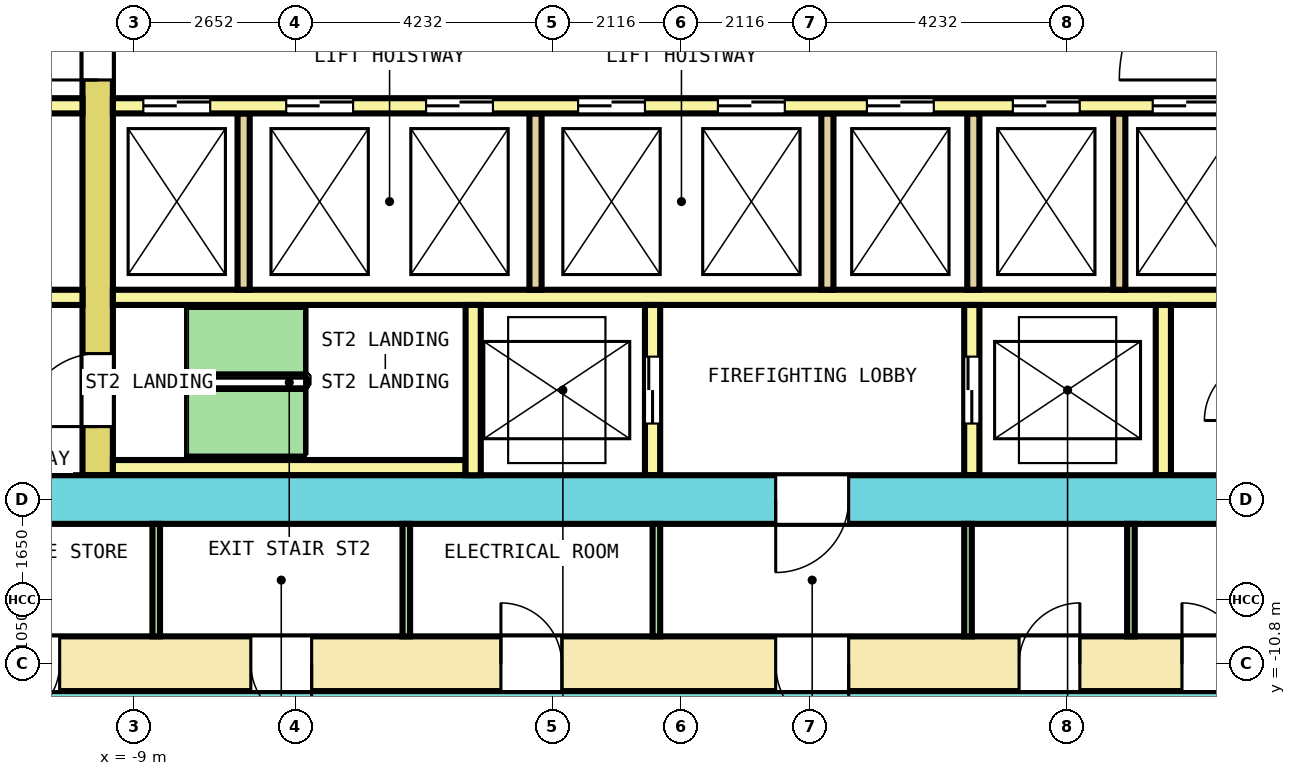
"""IFC4 building model, lengths in metres.
Left out: names, types, materials, properties, quantities, classifications, styles, units other than length and angle.
Written with IfcOpenShell. Run it as: python <this file> out.ifc"""

import sys

from ifc_helpers import new_model, si_unit, direction, frame, frame_2d, origin, place, context, subcontext, project, spatial, rectangle, extrude, element, fill, save


model = new_model("IFC4")
c1 = context("Model", 3, precision=1e-05, world=origin(), true_north=direction((0.0, 1.0)))
c2 = subcontext(c1, "Body", "Model", "MODEL_VIEW")
j1 = project(units=[si_unit("LENGTHUNIT", "METRE"), si_unit("PLANEANGLEUNIT", "RADIAN")], contexts=[c1])
p1 = place(None, origin())
s1 = spatial("IfcSite", under=j1, at=p1, CompositionType="ELEMENT")
p2 = place(p1, origin())
s2 = spatial("IfcBuilding", under=s1, at=p2, CompositionType="ELEMENT")
p3 = place(p2, origin())
s3 = spatial("IfcBuildingStorey", under=s2, at=p3, CompositionType="ELEMENT", Elevation=0.0)
p4 = place(p3, frame((-13.65, -10.8, 0.0), z_axis=(0.0, 0.0, 1.0), x_axis=(1.0, 0.0, 0.0)))
e1 = element("IfcWall", 1, at=p4, inside=s3, PredefinedType="SHEAR", context=c2, shape_type="SweptSolid", body=[
    extrude(rectangle(XDim=27.3, YDim=0.9, at=frame_2d((13.65, 0.0))), origin(), (0.0, 0.0, 1.0), 5.3),
])
p5 = place(p4, frame((2.425, 0.0, 0.0)))
e2 = element("IfcOpeningElement", 2, at=p5, cuts=e1, PredefinedType="OPENING", context=c2, shape_type="SweptSolid", body=[
    extrude(rectangle(XDim=1.0, YDim=2.1, at=frame_2d((0.5, 1.05))), frame((0.0, 0.46, 0.0), z_axis=(0.0, -1.0, 0.0), x_axis=(1.0, 0.0, 0.0)), (0.0, 0.0, 1.0), 0.92),
])
p6 = place(p4, frame((6.569, 0.0, 0.0)))
e3 = element("IfcOpeningElement", 3, at=p6, cuts=e1, PredefinedType="OPENING", context=c2, shape_type="SweptSolid", body=[
    extrude(rectangle(XDim=1.0, YDim=2.1, at=frame_2d((0.5, 1.05))), frame((0.0, 0.46, 0.0), z_axis=(0.0, -1.0, 0.0), x_axis=(1.0, 0.0, 0.0)), (0.0, 0.0, 1.0), 0.92),
])
p7 = place(p4, frame((10.681, 0.0, 0.0)))
e4 = element("IfcOpeningElement", 4, at=p7, cuts=e1, PredefinedType="OPENING", context=c2, shape_type="SweptSolid", body=[
    extrude(rectangle(XDim=1.0, YDim=2.1, at=frame_2d((0.5, 1.05))), frame((0.0, 0.46, 0.0), z_axis=(0.0, -1.0, 0.0), x_axis=(1.0, 0.0, 0.0)), (0.0, 0.0, 1.0), 0.92),
])
p8 = place(p4, frame((19.202, 0.0, 0.0)))
e5 = element("IfcOpeningElement", 5, at=p8, cuts=e1, PredefinedType="OPENING", context=c2, shape_type="SweptSolid", body=[
    extrude(rectangle(XDim=1.0, YDim=2.1, at=frame_2d((0.5, 1.05))), frame((0.0, 0.46, 0.0), z_axis=(0.0, -1.0, 0.0), x_axis=(1.0, 0.0, 0.0)), (0.0, 0.0, 1.0), 0.92),
])
p9 = place(p4, frame((21.881, 0.0, 0.0)))
e6 = element("IfcOpeningElement", 6, at=p9, cuts=e1, PredefinedType="OPENING", context=c2, shape_type="SweptSolid", body=[
    extrude(rectangle(XDim=1.0, YDim=2.1, at=frame_2d((0.5, 1.05))), frame((0.0, 0.46, 0.0), z_axis=(0.0, -1.0, 0.0), x_axis=(1.0, 0.0, 0.0)), (0.0, 0.0, 1.0), 0.92),
])
p10 = place(p4, frame((24.592, 0.0, 0.0)))
e7 = element("IfcOpeningElement", 7, at=p10, cuts=e1, PredefinedType="OPENING", context=c2, shape_type="SweptSolid", body=[
    extrude(rectangle(XDim=1.0, YDim=2.1, at=frame_2d((0.5, 1.05))), frame((0.0, 0.46, 0.0), z_axis=(0.0, -1.0, 0.0), x_axis=(1.0, 0.0, 0.0)), (0.0, 0.0, 1.0), 0.92),
])
p11 = place(p4, frame((15.2, 0.0, 0.0)))
e8 = element("IfcOpeningElement", 8, at=p11, cuts=e1, PredefinedType="OPENING", context=c2, shape_type="SweptSolid", body=[
    extrude(rectangle(XDim=1.2, YDim=2.1, at=frame_2d((0.6, 1.05))), frame((0.0, 0.46, 0.0), z_axis=(0.0, -1.0, 0.0), x_axis=(1.0, 0.0, 0.0)), (0.0, 0.0, 1.0), 0.92),
])
p12 = place(p3, frame((-12.75, -8.1, 0.0), z_axis=(0.0, 0.0, 1.0), x_axis=(1.0, 0.0, 0.0)))
e9 = element("IfcWall", 9, at=p12, inside=s3, PredefinedType="SHEAR", context=c2, shape_type="SweptSolid", body=[
    extrude(rectangle(XDim=25.5, YDim=0.8, at=frame_2d((12.75, 0.0))), origin(), (0.0, 0.0, 1.0), 5.3),
])
p13 = place(p12, frame((14.3, 0.0, 0.0)))
e10 = element("IfcOpeningElement", 10, at=p13, cuts=e9, PredefinedType="OPENING", context=c2, shape_type="SweptSolid", body=[
    extrude(rectangle(XDim=1.2, YDim=2.1, at=frame_2d((0.6, 1.05))), frame((0.0, 0.41, 0.0), z_axis=(0.0, -1.0, 0.0), x_axis=(1.0, 0.0, 0.0)), (0.0, 0.0, 1.0), 0.82),
])
p14 = place(p3, frame((-9.6, -7.7, 0.0), z_axis=(0.0, 0.0, 1.0), x_axis=(0.0, 1.0, 0.0)))
e11 = element("IfcWall", 11, at=p14, inside=s3, PredefinedType="SHEAR", context=c2, shape_type="SweptSolid", body=[
    extrude(rectangle(XDim=15.4, YDim=0.5, at=frame_2d((7.7, 0.0))), origin(), (0.0, 0.0, 1.0), 5.3),
])
p15 = place(p14, frame((6.5, 0.0, 0.0)))
e12 = element("IfcOpeningElement", 12, at=p15, cuts=e11, PredefinedType="OPENING", context=c2, shape_type="SweptSolid", body=[
    extrude(rectangle(XDim=2.4, YDim=2.1, at=frame_2d((1.2, 1.05))), frame((0.0, 0.26, 0.0), z_axis=(0.0, -1.0, 0.0), x_axis=(1.0, 0.0, 0.0)), (0.0, 0.0, 1.0), 0.52),
])
p16 = place(p14, frame((13.4, 0.0, 0.0)))
e13 = element("IfcOpeningElement", 13, at=p16, cuts=e11, PredefinedType="OPENING", context=c2, shape_type="SweptSolid", body=[
    extrude(rectangle(XDim=1.2, YDim=2.1, at=frame_2d((0.6, 1.05))), frame((0.0, 0.26, 0.0), z_axis=(0.0, -1.0, 0.0), x_axis=(1.0, 0.0, 0.0)), (0.0, 0.0, 1.0), 0.52),
])
p17 = place(p14, frame((0.8, 0.0, 0.0)))
e14 = element("IfcOpeningElement", 14, at=p17, cuts=e11, PredefinedType="OPENING", context=c2, shape_type="SweptSolid", body=[
    extrude(rectangle(XDim=1.2, YDim=2.1, at=frame_2d((0.6, 1.05))), frame((0.0, 0.26, 0.0), z_axis=(0.0, -1.0, 0.0), x_axis=(1.0, 0.0, 0.0)), (0.0, 0.0, 1.0), 0.52),
])
p18 = place(p3, frame((-12.75, -1.625, 0.0), z_axis=(0.0, 0.0, 1.0), x_axis=(1.0, 0.0, 0.0)))
e15 = element("IfcWall", 15, at=p18, inside=s3, PredefinedType="SOLIDWALL", context=c2, shape_type="SweptSolid", body=[
    extrude(rectangle(XDim=2.9, YDim=0.25, at=frame_2d((1.45, 0.0))), origin(), (0.0, 0.0, 1.0), 5.3),
])
p19 = place(p18, frame((0.9, 0.0, 0.0)))
e16 = element("IfcOpeningElement", 16, at=p19, cuts=e15, PredefinedType="OPENING", context=c2, shape_type="SweptSolid", body=[
    extrude(rectangle(XDim=1.1, YDim=2.1, at=frame_2d((0.55, 1.05))), frame((0.0, 0.135, 0.0), z_axis=(0.0, -1.0, 0.0), x_axis=(1.0, 0.0, 0.0)), (0.0, 0.0, 1.0), 0.27),
])
p20 = place(p3, frame((-9.35, -1.625, 0.0), z_axis=(0.0, 0.0, 1.0), x_axis=(1.0, 0.0, 0.0)))
e17 = element("IfcWall", 17, at=p20, inside=s3, PredefinedType="SOLIDWALL", context=c2, shape_type="SweptSolid", body=[
    extrude(rectangle(XDim=18.7, YDim=0.25, at=frame_2d((9.35, 0.0))), origin(), (0.0, 0.0, 1.0), 5.3),
])
p21 = place(p20, frame((0.5, 0.0, 0.0)))
e18 = element("IfcOpeningElement", 18, at=p21, cuts=e17, PredefinedType="OPENING", context=c2, shape_type="SweptSolid", body=[
    extrude(rectangle(XDim=1.1, YDim=2.1, at=frame_2d((0.55, 1.05))), frame((0.0, 0.135, 0.0), z_axis=(0.0, -1.0, 0.0), x_axis=(1.0, 0.0, 0.0)), (0.0, 0.0, 1.0), 0.27),
])
p22 = place(p20, frame((2.85, 0.0, 0.0)))
e19 = element("IfcOpeningElement", 19, at=p22, cuts=e17, PredefinedType="OPENING", context=c2, shape_type="SweptSolid", body=[
    extrude(rectangle(XDim=1.1, YDim=2.1, at=frame_2d((0.55, 1.05))), frame((0.0, 0.135, 0.0), z_axis=(0.0, -1.0, 0.0), x_axis=(1.0, 0.0, 0.0)), (0.0, 0.0, 1.0), 0.27),
])
p23 = place(p20, frame((5.15, 0.0, 0.0)))
e20 = element("IfcOpeningElement", 20, at=p23, cuts=e17, PredefinedType="OPENING", context=c2, shape_type="SweptSolid", body=[
    extrude(rectangle(XDim=1.1, YDim=2.1, at=frame_2d((0.55, 1.05))), frame((0.0, 0.135, 0.0), z_axis=(0.0, -1.0, 0.0), x_axis=(1.0, 0.0, 0.0)), (0.0, 0.0, 1.0), 0.27),
])
p24 = place(p20, frame((7.65, 0.0, 0.0)))
e21 = element("IfcOpeningElement", 21, at=p24, cuts=e17, PredefinedType="OPENING", context=c2, shape_type="SweptSolid", body=[
    extrude(rectangle(XDim=1.1, YDim=2.1, at=frame_2d((0.55, 1.05))), frame((0.0, 0.135, 0.0), z_axis=(0.0, -1.0, 0.0), x_axis=(1.0, 0.0, 0.0)), (0.0, 0.0, 1.0), 0.27),
])
p25 = place(p20, frame((9.95, 0.0, 0.0)))
e22 = element("IfcOpeningElement", 22, at=p25, cuts=e17, PredefinedType="OPENING", context=c2, shape_type="SweptSolid", body=[
    extrude(rectangle(XDim=1.1, YDim=2.1, at=frame_2d((0.55, 1.05))), frame((0.0, 0.135, 0.0), z_axis=(0.0, -1.0, 0.0), x_axis=(1.0, 0.0, 0.0)), (0.0, 0.0, 1.0), 0.27),
])
p26 = place(p20, frame((12.4, 0.0, 0.0)))
e23 = element("IfcOpeningElement", 23, at=p26, cuts=e17, PredefinedType="OPENING", context=c2, shape_type="SweptSolid", body=[
    extrude(rectangle(XDim=1.1, YDim=2.1, at=frame_2d((0.55, 1.05))), frame((0.0, 0.135, 0.0), z_axis=(0.0, -1.0, 0.0), x_axis=(1.0, 0.0, 0.0)), (0.0, 0.0, 1.0), 0.27),
])
p27 = place(p20, frame((14.8, 0.0, 0.0)))
e24 = element("IfcOpeningElement", 24, at=p27, cuts=e17, PredefinedType="OPENING", context=c2, shape_type="SweptSolid", body=[
    extrude(rectangle(XDim=1.1, YDim=2.1, at=frame_2d((0.55, 1.05))), frame((0.0, 0.135, 0.0), z_axis=(0.0, -1.0, 0.0), x_axis=(1.0, 0.0, 0.0)), (0.0, 0.0, 1.0), 0.27),
])
p28 = place(p20, frame((17.1, 0.0, 0.0)))
e25 = element("IfcOpeningElement", 25, at=p28, cuts=e17, PredefinedType="OPENING", context=c2, shape_type="SweptSolid", body=[
    extrude(rectangle(XDim=1.1, YDim=2.1, at=frame_2d((0.55, 1.05))), frame((0.0, 0.135, 0.0), z_axis=(0.0, -1.0, 0.0), x_axis=(1.0, 0.0, 0.0)), (0.0, 0.0, 1.0), 0.27),
])
p29 = place(p3, frame((-12.75, -4.775, 0.0), z_axis=(0.0, 0.0, 1.0), x_axis=(1.0, 0.0, 0.0)))
e26 = element("IfcWall", 26, at=p29, inside=s3, PredefinedType="SOLIDWALL", context=c2, shape_type="SweptSolid", body=[
    extrude(rectangle(XDim=2.9, YDim=0.25, at=frame_2d((1.45, 0.0))), origin(), (0.0, 0.0, 1.0), 5.3),
])
p30 = place(p3, frame((-9.35, -4.775, 0.0), z_axis=(0.0, 0.0, 1.0), x_axis=(1.0, 0.0, 0.0)))
e27 = element("IfcWall", 27, at=p30, inside=s3, PredefinedType="SOLIDWALL", context=c2, shape_type="SweptSolid", body=[
    extrude(rectangle(XDim=18.7, YDim=0.25, at=frame_2d((9.35, 0.0))), origin(), (0.0, 0.0, 1.0), 5.3),
])
for number, where, z_axis, x_axis in (
    (28, (-7.2, -4.65, 0.0), (0.0, 0.0, 1.0), (0.0, 1.0, 0.0)),
    (29, (-2.4, -4.65, 0.0), (0.0, 0.0, 1.0), (0.0, 1.0, 0.0)),
    (30, (2.4, -4.65, 0.0), (0.0, 0.0, 1.0), (0.0, 1.0, 0.0)),
    (31, (4.8, -4.65, 0.0), (0.0, 0.0, 1.0), (0.0, 1.0, 0.0)),
    (32, (7.2, -4.65, 0.0), (0.0, 0.0, 1.0), (0.0, 1.0, 0.0)),
):
    element("IfcWall", number, at=place(p3, frame(where, z_axis=z_axis, x_axis=x_axis)), inside=s3, PredefinedType="SOLIDWALL", context=c2, shape_type="SweptSolid", body=[
        extrude(rectangle(XDim=2.9, YDim=0.2, at=frame_2d((1.45, 0.0))), origin(), (0.0, 0.0, 1.0), 5.3),
    ])
p31 = place(p3, frame((-9.35, -7.575, 0.0), z_axis=(0.0, 0.0, 1.0), x_axis=(1.0, 0.0, 0.0)))
e33 = element("IfcWall", 33, at=p31, inside=s3, PredefinedType="SOLIDWALL", context=c2, shape_type="SweptSolid", body=[
    extrude(rectangle(XDim=5.8, YDim=0.25, at=frame_2d((2.9, 0.0))), origin(), (0.0, 0.0, 1.0), 5.3),
])
p32 = place(p3, frame((-3.425, -7.7, 0.0), z_axis=(0.0, 0.0, 1.0), x_axis=(0.0, 1.0, 0.0)))
e34 = element("IfcWall", 34, at=p32, inside=s3, PredefinedType="SOLIDWALL", context=c2, shape_type="SweptSolid", body=[
    extrude(rectangle(XDim=2.8, YDim=0.25, at=frame_2d((1.4, 0.0))), origin(), (0.0, 0.0, 1.0), 5.3),
])
p33 = place(p3, frame((-0.475, -7.7, 0.0), z_axis=(0.0, 0.0, 1.0), x_axis=(0.0, 1.0, 0.0)))
e35 = element("IfcWall", 35, at=p33, inside=s3, PredefinedType="SOLIDWALL", context=c2, shape_type="SweptSolid", body=[
    extrude(rectangle(XDim=2.8, YDim=0.25, at=frame_2d((1.4, 0.0))), origin(), (0.0, 0.0, 1.0), 5.3),
])
p34 = place(p33, frame((0.85, 0.0, 0.0)))
e36 = element("IfcOpeningElement", 36, at=p34, cuts=e35, PredefinedType="OPENING", context=c2, shape_type="SweptSolid", body=[
    extrude(rectangle(XDim=1.1, YDim=2.1, at=frame_2d((0.55, 1.05))), frame((0.0, 0.135, 0.0), z_axis=(0.0, -1.0, 0.0), x_axis=(1.0, 0.0, 0.0)), (0.0, 0.0, 1.0), 0.27),
])
p35 = place(p3, frame((4.775, -7.7, 0.0), z_axis=(0.0, 0.0, 1.0), x_axis=(0.0, 1.0, 0.0)))
e37 = element("IfcWall", 37, at=p35, inside=s3, PredefinedType="SOLIDWALL", context=c2, shape_type="SweptSolid", body=[
    extrude(rectangle(XDim=2.8, YDim=0.25, at=frame_2d((1.4, 0.0))), origin(), (0.0, 0.0, 1.0), 5.3),
])
p36 = place(p35, frame((0.85, 0.0, 0.0)))
e38 = element("IfcOpeningElement", 38, at=p36, cuts=e37, PredefinedType="OPENING", context=c2, shape_type="SweptSolid", body=[
    extrude(rectangle(XDim=1.1, YDim=2.1, at=frame_2d((0.55, 1.05))), frame((0.0, 0.135, 0.0), z_axis=(0.0, -1.0, 0.0), x_axis=(1.0, 0.0, 0.0)), (0.0, 0.0, 1.0), 0.27),
])
p37 = place(p3, frame((7.925, -7.7, 0.0), z_axis=(0.0, 0.0, 1.0), x_axis=(0.0, 1.0, 0.0)))
e39 = element("IfcWall", 39, at=p37, inside=s3, PredefinedType="SOLIDWALL", context=c2, shape_type="SweptSolid", body=[
    extrude(rectangle(XDim=2.8, YDim=0.25, at=frame_2d((1.4, 0.0))), origin(), (0.0, 0.0, 1.0), 5.3),
])
for number, where, z_axis, x_axis in (
    (40, (-8.637, -10.35, 0.0), (0.0, 0.0, 1.0), (0.0, 1.0, 0.0)),
    (41, (-4.525, -10.35, 0.0), (0.0, 0.0, 1.0), (0.0, 1.0, 0.0)),
    (42, (-0.413, -10.35, 0.0), (0.0, 0.0, 1.0), (0.0, 1.0, 0.0)),
    (43, (4.712, -10.35, 0.0), (0.0, 0.0, 1.0), (0.0, 1.0, 0.0)),
    (44, (7.392, -10.35, 0.0), (0.0, 0.0, 1.0), (0.0, 1.0, 0.0)),
):
    element("IfcWall", number, at=place(p3, frame(where, z_axis=z_axis, x_axis=x_axis)), inside=s3, PredefinedType="PARTITIONING", context=c2, shape_type="SweptSolid", body=[
        extrude(rectangle(XDim=1.85, YDim=0.125, at=frame_2d((0.925, 0.0))), origin(), (0.0, 0.0, 1.0), 5.3),
    ])
p38 = place(p21, origin())
e45 = element("IfcDoor", 45, at=p38, inside=s3, OperationType="DOUBLE_DOOR_SLIDING", PredefinedType="DOOR", context=c2, shape_type="SweptSolid", body=[
    extrude(rectangle(XDim=1.1, YDim=2.1, at=frame_2d((0.55, 1.05))), frame((0.0, 0.075, 0.0), z_axis=(0.0, -1.0, 0.0), x_axis=(1.0, 0.0, 0.0)), (0.0, 0.0, 1.0), 0.15),
])
fill(e18, e45)
p39 = place(p22, origin())
e46 = element("IfcDoor", 46, at=p39, inside=s3, OperationType="DOUBLE_DOOR_SLIDING", PredefinedType="DOOR", context=c2, shape_type="SweptSolid", body=[
    extrude(rectangle(XDim=1.1, YDim=2.1, at=frame_2d((0.55, 1.05))), frame((0.0, 0.075, 0.0), z_axis=(0.0, -1.0, 0.0), x_axis=(1.0, 0.0, 0.0)), (0.0, 0.0, 1.0), 0.15),
])
fill(e19, e46)
p40 = place(p23, origin())
e47 = element("IfcDoor", 47, at=p40, inside=s3, OperationType="DOUBLE_DOOR_SLIDING", PredefinedType="DOOR", context=c2, shape_type="SweptSolid", body=[
    extrude(rectangle(XDim=1.1, YDim=2.1, at=frame_2d((0.55, 1.05))), frame((0.0, 0.075, 0.0), z_axis=(0.0, -1.0, 0.0), x_axis=(1.0, 0.0, 0.0)), (0.0, 0.0, 1.0), 0.15),
])
fill(e20, e47)
p41 = place(p24, origin())
e48 = element("IfcDoor", 48, at=p41, inside=s3, OperationType="DOUBLE_DOOR_SLIDING", PredefinedType="DOOR", context=c2, shape_type="SweptSolid", body=[
    extrude(rectangle(XDim=1.1, YDim=2.1, at=frame_2d((0.55, 1.05))), frame((0.0, 0.075, 0.0), z_axis=(0.0, -1.0, 0.0), x_axis=(1.0, 0.0, 0.0)), (0.0, 0.0, 1.0), 0.15),
])
fill(e21, e48)
p42 = place(p25, origin())
e49 = element("IfcDoor", 49, at=p42, inside=s3, OperationType="DOUBLE_DOOR_SLIDING", PredefinedType="DOOR", context=c2, shape_type="SweptSolid", body=[
    extrude(rectangle(XDim=1.1, YDim=2.1, at=frame_2d((0.55, 1.05))), frame((0.0, 0.075, 0.0), z_axis=(0.0, -1.0, 0.0), x_axis=(1.0, 0.0, 0.0)), (0.0, 0.0, 1.0), 0.15),
])
fill(e22, e49)
p43 = place(p26, origin())
e50 = element("IfcDoor", 50, at=p43, inside=s3, OperationType="DOUBLE_DOOR_SLIDING", PredefinedType="DOOR", context=c2, shape_type="SweptSolid", body=[
    extrude(rectangle(XDim=1.1, YDim=2.1, at=frame_2d((0.55, 1.05))), frame((0.0, 0.075, 0.0), z_axis=(0.0, -1.0, 0.0), x_axis=(1.0, 0.0, 0.0)), (0.0, 0.0, 1.0), 0.15),
])
fill(e23, e50)
p44 = place(p27, origin())
e51 = element("IfcDoor", 51, at=p44, inside=s3, OperationType="DOUBLE_DOOR_SLIDING", PredefinedType="DOOR", context=c2, shape_type="SweptSolid", body=[
    extrude(rectangle(XDim=1.1, YDim=2.1, at=frame_2d((0.55, 1.05))), frame((0.0, 0.075, 0.0), z_axis=(0.0, -1.0, 0.0), x_axis=(1.0, 0.0, 0.0)), (0.0, 0.0, 1.0), 0.15),
])
fill(e24, e51)
p45 = place(p28, origin())
e52 = element("IfcDoor", 52, at=p45, inside=s3, OperationType="DOUBLE_DOOR_SLIDING", PredefinedType="DOOR", context=c2, shape_type="SweptSolid", body=[
    extrude(rectangle(XDim=1.1, YDim=2.1, at=frame_2d((0.55, 1.05))), frame((0.0, 0.075, 0.0), z_axis=(0.0, -1.0, 0.0), x_axis=(1.0, 0.0, 0.0)), (0.0, 0.0, 1.0), 0.15),
])
fill(e25, e52)
p46 = place(p34, origin())
e53 = element("IfcDoor", 53, at=p46, inside=s3, OperationType="DOUBLE_DOOR_SLIDING", PredefinedType="DOOR", context=c2, shape_type="SweptSolid", body=[
    extrude(rectangle(XDim=1.1, YDim=2.1, at=frame_2d((0.55, 1.05))), frame((0.0, 0.075, 0.0), z_axis=(0.0, -1.0, 0.0), x_axis=(1.0, 0.0, 0.0)), (0.0, 0.0, 1.0), 0.15),
])
fill(e36, e53)
p47 = place(p36, origin())
e54 = element("IfcDoor", 54, at=p47, inside=s3, OperationType="DOUBLE_DOOR_SLIDING", PredefinedType="DOOR", context=c2, shape_type="SweptSolid", body=[
    extrude(rectangle(XDim=1.1, YDim=2.1, at=frame_2d((0.55, 1.05))), frame((0.0, 0.075, 0.0), z_axis=(0.0, -1.0, 0.0), x_axis=(1.0, 0.0, 0.0)), (0.0, 0.0, 1.0), 0.15),
])
fill(e38, e54)
p48 = place(p15, origin())
e55 = element("IfcDoor", 55, at=p48, inside=s3, OperationType="DOUBLE_DOOR_SINGLE_SWING", PredefinedType="DOOR", context=c2, shape_type="SweptSolid", body=[
    extrude(rectangle(XDim=2.4, YDim=2.1, at=frame_2d((1.2, 1.05))), frame((0.0, 0.2, 0.0), z_axis=(0.0, -1.0, 0.0), x_axis=(1.0, 0.0, 0.0)), (0.0, 0.0, 1.0), 0.4),
])
fill(e12, e55)
p49 = place(p17, origin())
e56 = element("IfcDoor", 56, at=p49, inside=s3, OperationType="SINGLE_SWING_LEFT", PredefinedType="DOOR", context=c2, shape_type="SweptSolid", body=[
    extrude(rectangle(XDim=1.2, YDim=2.1, at=frame_2d((0.6, 1.05))), frame((0.0, 0.2, 0.0), z_axis=(0.0, -1.0, 0.0), x_axis=(1.0, 0.0, 0.0)), (0.0, 0.0, 1.0), 0.4),
])
fill(e14, e56)
p50 = place(p13, origin())
e57 = element("IfcDoor", 57, at=p50, inside=s3, OperationType="SINGLE_SWING_LEFT", PredefinedType="DOOR", context=c2, shape_type="SweptSolid", body=[
    extrude(rectangle(XDim=1.2, YDim=2.1, at=frame_2d((0.6, 1.05))), frame((0.0, 0.3, 0.0), z_axis=(0.0, -1.0, 0.0), x_axis=(1.0, 0.0, 0.0)), (0.0, 0.0, 1.0), 0.6),
])
fill(e10, e57)
p51 = place(p5, origin())
e58 = element("IfcDoor", 58, at=p51, inside=s3, OperationType="SINGLE_SWING_RIGHT", PredefinedType="DOOR", context=c2, shape_type="SweptSolid", body=[
    extrude(rectangle(XDim=1.0, YDim=2.1, at=frame_2d((0.5, 1.05))), frame((0.0, 0.3, 0.0), z_axis=(0.0, -1.0, 0.0), x_axis=(1.0, 0.0, 0.0)), (0.0, 0.0, 1.0), 0.6),
])
fill(e2, e58)
p52 = place(p6, origin())
e59 = element("IfcDoor", 59, at=p52, inside=s3, OperationType="SINGLE_SWING_LEFT", PredefinedType="DOOR", context=c2, shape_type="SweptSolid", body=[
    extrude(rectangle(XDim=1.0, YDim=2.1, at=frame_2d((0.5, 1.05))), frame((0.0, 0.3, 0.0), z_axis=(0.0, -1.0, 0.0), x_axis=(1.0, 0.0, 0.0)), (0.0, 0.0, 1.0), 0.6),
])
fill(e3, e59)
p53 = place(p7, origin())
e60 = element("IfcDoor", 60, at=p53, inside=s3, OperationType="SINGLE_SWING_RIGHT", PredefinedType="DOOR", context=c2, shape_type="SweptSolid", body=[
    extrude(rectangle(XDim=1.0, YDim=2.1, at=frame_2d((0.5, 1.05))), frame((0.0, 0.3, 0.0), z_axis=(0.0, -1.0, 0.0), x_axis=(1.0, 0.0, 0.0)), (0.0, 0.0, 1.0), 0.6),
])
fill(e4, e60)
p54 = place(p8, origin())
e61 = element("IfcDoor", 61, at=p54, inside=s3, OperationType="SINGLE_SWING_LEFT", PredefinedType="DOOR", context=c2, shape_type="SweptSolid", body=[
    extrude(rectangle(XDim=1.0, YDim=2.1, at=frame_2d((0.5, 1.05))), frame((0.0, 0.3, 0.0), z_axis=(0.0, -1.0, 0.0), x_axis=(1.0, 0.0, 0.0)), (0.0, 0.0, 1.0), 0.6),
])
fill(e5, e61)
p55 = place(p9, origin())
e62 = element("IfcDoor", 62, at=p55, inside=s3, OperationType="SINGLE_SWING_RIGHT", PredefinedType="DOOR", context=c2, shape_type="SweptSolid", body=[
    extrude(rectangle(XDim=1.0, YDim=2.1, at=frame_2d((0.5, 1.05))), frame((0.0, 0.3, 0.0), z_axis=(0.0, -1.0, 0.0), x_axis=(1.0, 0.0, 0.0)), (0.0, 0.0, 1.0), 0.6),
])
fill(e6, e62)
p56 = place(p11, origin())
e63 = element("IfcDoor", 63, at=p56, inside=s3, OperationType="SINGLE_SWING_RIGHT", PredefinedType="DOOR", context=c2, shape_type="SweptSolid", body=[
    extrude(rectangle(XDim=1.2, YDim=2.1, at=frame_2d((0.6, 1.05))), frame((0.0, 0.3, 0.0), z_axis=(0.0, -1.0, 0.0), x_axis=(1.0, 0.0, 0.0)), (0.0, 0.0, 1.0), 0.6),
])
fill(e8, e63)
save(model, sys.argv[1])
